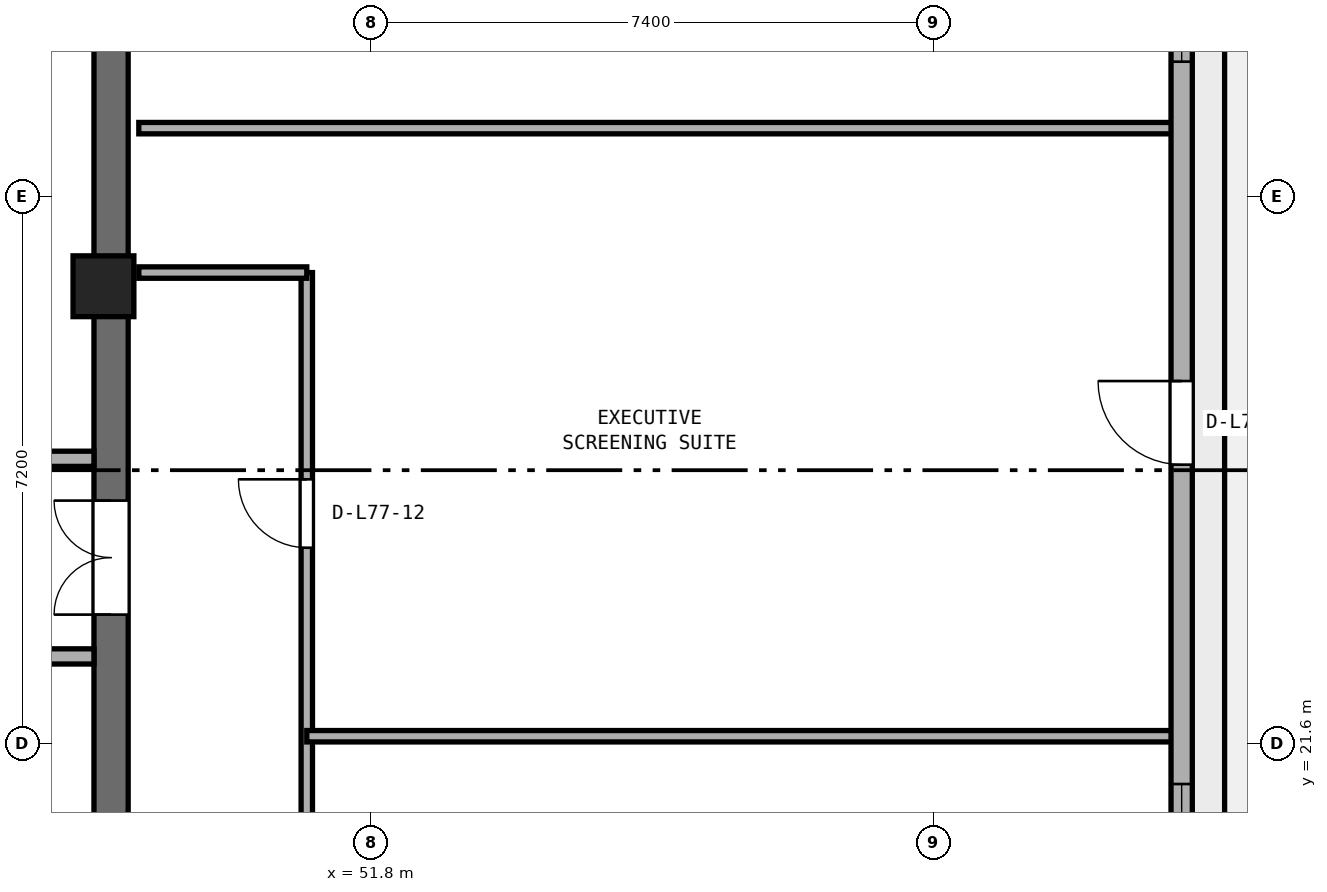
"""IFC4 building model, lengths in metres.
Left out: names, types, materials, properties, quantities, classifications, styles, units other than length and angle.
Written with IfcOpenShell. Run it as: python <this file> out.ifc"""

import sys

from ifc_helpers import new_model, si_unit, direction, frame, frame_2d, origin, origin_2d, place, context, subcontext, project, spatial, rectangle, extrude, element, fill, save


model = new_model("IFC4")
c1 = context("Model", 3, precision=1e-05, world=origin(), true_north=direction((0.0, 1.0)))
c2 = subcontext(c1, "Body", "Model", "MODEL_VIEW")
j1 = project(units=[si_unit("LENGTHUNIT", "METRE"), si_unit("PLANEANGLEUNIT", "RADIAN")], contexts=[c1])
p1 = place(None, origin())
s1 = spatial("IfcSite", under=j1, at=p1, CompositionType="ELEMENT")
p2 = place(p1, origin())
s2 = spatial("IfcBuilding", under=s1, at=p2, CompositionType="ELEMENT")
p3 = place(p2, frame((0.0, 0.0, 301.0)))
s3 = spatial("IfcBuildingStorey", under=s2, at=p3, CompositionType="ELEMENT", Elevation=301.0)
p4 = place(p3, frame((48.375, 17.45, 0.0), z_axis=(0.0, 0.0, 1.0), x_axis=(0.0, 1.0, 0.0)))
e1 = element("IfcWall", 1, at=p4, inside=s3, PredefinedType="SHEAR", context=c2, shape_type="SweptSolid", body=[
    extrude(rectangle(XDim=15.5, YDim=0.45, at=frame_2d((7.75, 0.0))), origin(), (0.0, 0.0, 1.0), 3.54),
])
p5 = place(p4, frame((5.85, 0.0, 0.0)))
e2 = element("IfcOpeningElement", 2, at=p5, cuts=e1, PredefinedType="OPENING", context=c2, shape_type="SweptSolid", body=[
    extrude(rectangle(XDim=1.5, YDim=2.15, at=frame_2d((0.75, 1.075))), frame((0.0, 0.235, 0.0), z_axis=(0.0, -1.0, 0.0), x_axis=(1.0, 0.0, 0.0)), (0.0, 0.0, 1.0), 0.47),
])
p6 = place(p3, frame((48.275, 27.62, 0.0), z_axis=(0.0, 0.0, 1.0), x_axis=(1.0, 0.0, 0.0)))
e3 = element("IfcColumn", 3, at=p6, inside=s3, PredefinedType="PILASTER", context=c2, shape_type="SweptSolid", body=[
    extrude(rectangle(XDim=0.8, YDim=0.8, at=origin_2d()), origin(), (0.0, 0.0, 1.0), 3.8),
])
p7 = place(p3, frame((42.0, 22.75, 0.0), z_axis=(0.0, 0.0, 1.0), x_axis=(1.0, 0.0, 0.0)))
e4 = element("IfcWall", 4, at=p7, inside=s3, PredefinedType="SOLIDWALL", context=c2, shape_type="SweptSolid", body=[
    extrude(rectangle(XDim=6.15, YDim=0.2, at=frame_2d((3.075, 0.0))), origin(), (0.0, 0.0, 1.0), 3.54),
])
p8 = place(p3, frame((46.1, 25.35, 0.0), z_axis=(0.0, 0.0, 1.0), x_axis=(1.0, 0.0, 0.0)))
e5 = element("IfcWall", 5, at=p8, inside=s3, PredefinedType="SOLIDWALL", context=c2, shape_type="SweptSolid", body=[
    extrude(rectangle(XDim=2.05, YDim=0.2, at=frame_2d((1.025, 0.0))), origin(), (0.0, 0.0, 1.0), 3.54),
])
p9 = place(p3, frame((50.95, 14.65, 0.0), z_axis=(0.0, 0.0, 1.0), x_axis=(0.0, 1.0, 0.0)))
e6 = element("IfcWall", 6, at=p9, inside=s3, PredefinedType="PARTITIONING", context=c2, shape_type="SweptSolid", body=[
    extrude(rectangle(XDim=13.15, YDim=0.15, at=frame_2d((6.575, 0.0))), origin(), (0.0, 0.0, 1.0), 3.54),
])
p10 = place(p9, frame((4.275, 0.0, 0.0)))
e7 = element("IfcOpeningElement", 7, at=p10, cuts=e6, PredefinedType="OPENING", context=c2, shape_type="SweptSolid", body=[
    extrude(rectangle(XDim=0.9, YDim=2.1, at=frame_2d((0.45, 1.05))), frame((0.0, 0.085, 0.0), z_axis=(0.0, -1.0, 0.0), x_axis=(1.0, 0.0, 0.0)), (0.0, 0.0, 1.0), 0.17),
])
p11 = place(p9, frame((9.53, 0.0, 0.0)))
e8 = element("IfcOpeningElement", 8, at=p11, cuts=e6, PredefinedType="OPENING", context=c2, shape_type="SweptSolid", body=[
    extrude(rectangle(XDim=0.9, YDim=2.1, at=frame_2d((0.45, 1.05))), frame((0.0, 0.085, 0.0), z_axis=(0.0, -1.0, 0.0), x_axis=(1.0, 0.0, 0.0)), (0.0, 0.0, 1.0), 0.17),
])
p12 = place(p3, frame((50.95, 21.7, 0.0), z_axis=(0.0, 0.0, 1.0), x_axis=(1.0, 0.0, 0.0)))
e9 = element("IfcWall", 9, at=p12, inside=s3, PredefinedType="PARTITIONING", context=c2, shape_type="SweptSolid", body=[
    extrude(rectangle(XDim=11.445, YDim=0.15, at=frame_2d((5.723, 0.0))), origin(), (0.0, 0.0, 1.0), 3.54),
])
p13 = place(p3, frame((48.74, 27.8, 0.0), z_axis=(0.0, 0.0, 1.0), x_axis=(1.0, 0.0, 0.0)))
e10 = element("IfcWall", 10, at=p13, inside=s3, PredefinedType="PARTITIONING", context=c2, shape_type="SweptSolid", body=[
    extrude(rectangle(XDim=2.21, YDim=0.15, at=frame_2d((1.105, 0.0))), origin(), (0.0, 0.0, 1.0), 3.54),
])
p14 = place(p3, frame((48.74, 29.7, 0.0), z_axis=(0.0, 0.0, 1.0), x_axis=(1.0, 0.0, 0.0)))
e11 = element("IfcWall", 11, at=p14, inside=s3, PredefinedType="PARTITIONING", context=c2, shape_type="SweptSolid", body=[
    extrude(rectangle(XDim=13.655, YDim=0.15, at=frame_2d((6.828, 0.0))), origin(), (0.0, 0.0, 1.0), 3.54),
])
p15 = place(p3, frame((62.46, 16.396, 0.0), z_axis=(0.0, 0.0, 1.0), x_axis=(0.0, 1.0, 0.0)))
e12 = element("IfcWall", 12, at=p15, inside=s3, PredefinedType="STANDARD", context=c2, shape_type="SweptSolid", body=[
    extrude(rectangle(XDim=18.854, YDim=0.28, at=frame_2d((9.427, 0.0))), origin(), (0.0, 0.0, 1.0), 3.54),
])
p16 = place(p15, frame((8.877, 0.0, 0.0)))
e13 = element("IfcOpeningElement", 13, at=p16, cuts=e12, PredefinedType="OPENING", context=c2, shape_type="SweptSolid", body=[
    extrude(rectangle(XDim=1.1, YDim=2.2, at=frame_2d((0.55, 1.1))), frame((0.0, 0.15, 0.0), z_axis=(0.0, -1.0, 0.0), x_axis=(1.0, 0.0, 0.0)), (0.0, 0.0, 1.0), 0.3),
])
p17 = place(p15, frame((2.276, 0.0, 0.9)))
e14 = element("IfcOpeningElement", 14, at=p17, cuts=e12, PredefinedType="OPENING", context=c2, shape_type="SweptSolid", body=[
    extrude(rectangle(XDim=2.4, YDim=1.75, at=frame_2d((1.2, 0.875))), frame((0.0, 0.15, 0.0), z_axis=(0.0, -1.0, 0.0), x_axis=(1.0, 0.0, 0.0)), (0.0, 0.0, 1.0), 0.3),
])
p18 = place(p15, frame((14.179, 0.0, 0.9)))
e15 = element("IfcOpeningElement", 15, at=p18, cuts=e12, PredefinedType="OPENING", context=c2, shape_type="SweptSolid", body=[
    extrude(rectangle(XDim=2.4, YDim=1.75, at=frame_2d((1.2, 0.875))), frame((0.0, 0.15, 0.0), z_axis=(0.0, -1.0, 0.0), x_axis=(1.0, 0.0, 0.0)), (0.0, 0.0, 1.0), 0.3),
])
p19 = place(p5, origin())
e16 = element("IfcDoor", 16, at=p19, inside=s3, OperationType="DOUBLE_DOOR_SINGLE_SWING", PredefinedType="DOOR", context=c2, shape_type="SweptSolid", body=[
    extrude(rectangle(XDim=1.5, YDim=2.15, at=frame_2d((0.75, 1.075))), frame((0.0, 0.025, 0.0), z_axis=(0.0, -1.0, 0.0), x_axis=(1.0, 0.0, 0.0)), (0.0, 0.0, 1.0), 0.05),
])
fill(e2, e16)
p20 = place(p11, origin())
e17 = element("IfcDoor", 17, at=p20, inside=s3, OperationType="SINGLE_SWING_RIGHT", PredefinedType="DOOR", context=c2, shape_type="SweptSolid", body=[
    extrude(rectangle(XDim=0.9, YDim=2.1, at=frame_2d((0.45, 1.05))), frame((0.0, 0.025, 0.0), z_axis=(0.0, -1.0, 0.0), x_axis=(1.0, 0.0, 0.0)), (0.0, 0.0, 1.0), 0.05),
])
fill(e8, e17)
p21 = place(p16, origin())
e18 = element("IfcDoor", 18, at=p21, inside=s3, OperationType="SINGLE_SWING_RIGHT", PredefinedType="DOOR", context=c2, shape_type="SweptSolid", body=[
    extrude(rectangle(XDim=1.1, YDim=2.2, at=frame_2d((0.55, 1.1))), frame((0.0, 0.025, 0.0), z_axis=(0.0, -1.0, 0.0), x_axis=(1.0, 0.0, 0.0)), (0.0, 0.0, 1.0), 0.05),
])
fill(e13, e18)
p22 = place(p17, origin())
e19 = element("IfcWindow", 19, at=p22, inside=s3, PartitioningType="SINGLE_PANEL", PredefinedType="WINDOW", context=c2, shape_type="SweptSolid", body=[
    extrude(rectangle(XDim=2.4, YDim=1.75, at=frame_2d((1.2, 0.875))), frame((0.0, 0.03, 0.0), z_axis=(0.0, -1.0, 0.0), x_axis=(1.0, 0.0, 0.0)), (0.0, 0.0, 1.0), 0.06),
])
fill(e14, e19)
p23 = place(p18, origin())
e20 = element("IfcWindow", 20, at=p23, inside=s3, PartitioningType="SINGLE_PANEL", PredefinedType="WINDOW", context=c2, shape_type="SweptSolid", body=[
    extrude(rectangle(XDim=2.4, YDim=1.75, at=frame_2d((1.2, 0.875))), frame((0.0, 0.03, 0.0), z_axis=(0.0, -1.0, 0.0), x_axis=(1.0, 0.0, 0.0)), (0.0, 0.0, 1.0), 0.06),
])
fill(e15, e20)
save(model, sys.argv[1])
